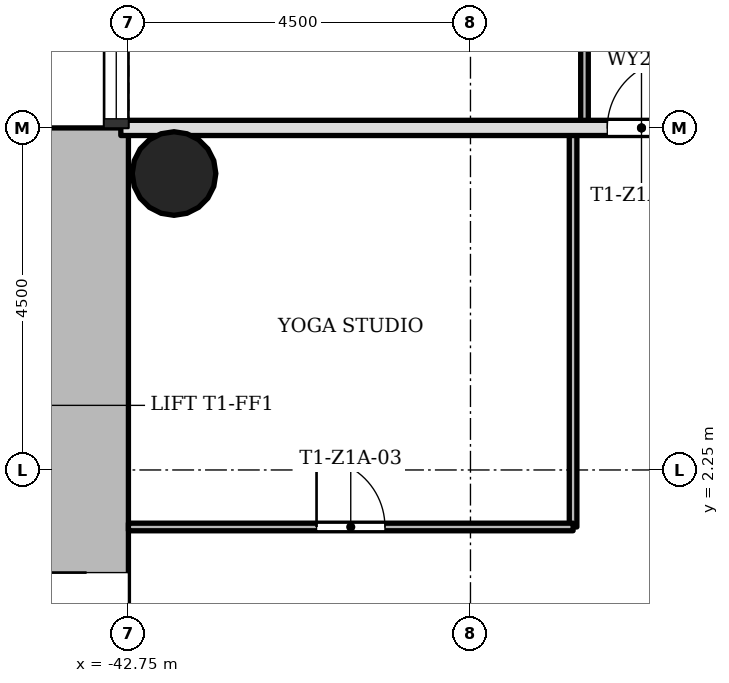
"""IFC4 building model, lengths in metres.
Left out: names, types, materials, properties, quantities, classifications, styles, units other than length and angle.
Written with IfcOpenShell. Run it as: python <this file> out.ifc"""

import sys

from ifc_helpers import new_model, si_unit, direction, frame, frame_2d, origin, origin_2d, place, context, subcontext, project, spatial, rectangle, hollow_circle, extrude, element, fill, save


model = new_model("IFC4")
c1 = context("Model", 3, precision=1e-05, world=origin(), true_north=direction((0.0, 1.0)))
c2 = subcontext(c1, "Body", "Model", "MODEL_VIEW")
j1 = project(units=[si_unit("LENGTHUNIT", "METRE"), si_unit("PLANEANGLEUNIT", "RADIAN")], contexts=[c1])
p1 = place(None, origin())
s1 = spatial("IfcSite", under=j1, at=p1, CompositionType="ELEMENT")
p2 = place(p1, origin())
s2 = spatial("IfcBuilding", under=s1, at=p2, CompositionType="ELEMENT")
p3 = place(p2, frame((0.0, 0.0, 27.9)))
s3 = spatial("IfcBuildingStorey", under=s2, at=p3, CompositionType="ELEMENT", Elevation=27.9)
p4 = place(p3, frame((-43.3, -5.65, 0.0), z_axis=(0.0, 0.0, 1.0), x_axis=(0.0, 1.0, 0.0)))
e1 = element("IfcWall", 1, at=p4, inside=s3, PredefinedType="SHEAR", context=c2, shape_type="SweptSolid", body=[
    extrude(rectangle(XDim=12.4, YDim=1.1, at=frame_2d((6.2, 0.0))), origin(), (0.0, 0.0, 1.0), 3.4),
])
p5 = place(p4, frame((4.75, 0.0, 0.0)))
e2 = element("IfcOpeningElement", 2, at=p5, cuts=e1, PredefinedType="OPENING", context=c2, shape_type="SweptSolid", body=[
    extrude(rectangle(XDim=1.8, YDim=2.1, at=frame_2d((0.9, 1.05))), frame((0.0, 0.56, 0.0), z_axis=(0.0, -1.0, 0.0), x_axis=(1.0, 0.0, 0.0)), (0.0, 0.0, 1.0), 1.12),
])
p6 = place(p3, frame((-42.15, 6.15, 0.0), z_axis=(0.0, 0.0, 1.0), x_axis=(1.0, 0.0, 0.0)))
e3 = element("IfcColumn", 3, at=p6, inside=s3, PredefinedType="COLUMN", context=c2, shape_type="SweptSolid", body=[
    extrude(hollow_circle(Radius=0.55, WallThickness=0.04, at=origin_2d()), origin(), (0.0, 0.0, 1.0), 3.4),
])
p7 = place(p3, frame((-36.9, 1.5, 0.0), z_axis=(0.0, 0.0, 1.0), x_axis=(0.0, 1.0, 0.0)))
e4 = element("IfcWall", 4, at=p7, inside=s3, PredefinedType="PARTITIONING", context=c2, shape_type="SweptSolid", body=[
    extrude(rectangle(XDim=5.25, YDim=0.1, at=frame_2d((2.625, 0.0))), origin(), (0.0, 0.0, 1.0), 3.0),
])
p8 = place(p3, frame((-36.75, 6.75, 0.0), z_axis=(0.0, 0.0, 1.0), x_axis=(0.0, 1.0, 0.0)))
e5 = element("IfcWall", 5, at=p8, inside=s3, PredefinedType="PARTITIONING", context=c2, shape_type="SweptSolid", body=[
    extrude(rectangle(XDim=7.8, YDim=0.1, at=frame_2d((3.9, 0.0))), origin(), (0.0, 0.0, 1.0), 3.0),
])
p9 = place(p8, frame((1.8, 0.0, 0.0)))
e6 = element("IfcOpeningElement", 6, at=p9, cuts=e5, PredefinedType="OPENING", context=c2, shape_type="SweptSolid", body=[
    extrude(rectangle(XDim=0.9, YDim=2.1, at=frame_2d((0.45, 1.05))), frame((0.0, 0.06, 0.0), z_axis=(0.0, -1.0, 0.0), x_axis=(1.0, 0.0, 0.0)), (0.0, 0.0, 1.0), 0.12),
])
p10 = place(p8, frame((4.95, 0.0, 0.0)))
e7 = element("IfcOpeningElement", 7, at=p10, cuts=e5, PredefinedType="OPENING", context=c2, shape_type="SweptSolid", body=[
    extrude(rectangle(XDim=0.9, YDim=2.1, at=frame_2d((0.45, 1.05))), frame((0.0, 0.06, 0.0), z_axis=(0.0, -1.0, 0.0), x_axis=(1.0, 0.0, 0.0)), (0.0, 0.0, 1.0), 0.12),
])
p11 = place(p8, frame((6.6, 0.0, 0.0)))
e8 = element("IfcOpeningElement", 8, at=p11, cuts=e5, PredefinedType="OPENING", context=c2, shape_type="SweptSolid", body=[
    extrude(rectangle(XDim=0.9, YDim=2.1, at=frame_2d((0.45, 1.05))), frame((0.0, 0.06, 0.0), z_axis=(0.0, -1.0, 0.0), x_axis=(1.0, 0.0, 0.0)), (0.0, 0.0, 1.0), 0.12),
])
p12 = place(p3, frame((-42.75, 1.5, 0.0), z_axis=(0.0, 0.0, 1.0), x_axis=(1.0, 0.0, 0.0)))
e9 = element("IfcWall", 9, at=p12, inside=s3, PredefinedType="PARTITIONING", context=c2, shape_type="SweptSolid", body=[
    extrude(rectangle(XDim=5.85, YDim=0.1, at=frame_2d((2.925, 0.0))), origin(), (0.0, 0.0, 1.0), 3.0),
])
p13 = place(p12, frame((2.475, 0.0, 0.0)))
e10 = element("IfcOpeningElement", 10, at=p13, cuts=e9, PredefinedType="OPENING", context=c2, shape_type="SweptSolid", body=[
    extrude(rectangle(XDim=0.9, YDim=2.1, at=frame_2d((0.45, 1.05))), frame((0.0, 0.06, 0.0), z_axis=(0.0, -1.0, 0.0), x_axis=(1.0, 0.0, 0.0)), (0.0, 0.0, 1.0), 0.12),
])
p14 = place(p3, frame((-42.85, 6.75, 0.0), z_axis=(0.0, 0.0, 1.0), x_axis=(1.0, 0.0, 0.0)))
e11 = element("IfcWall", 11, at=p14, inside=s3, PredefinedType="SOLIDWALL", context=c2, shape_type="SweptSolid", body=[
    extrude(rectangle(XDim=13.7, YDim=0.2, at=frame_2d((6.85, 0.0))), origin(), (0.0, 0.0, 1.0), 3.0),
])
p15 = place(p14, frame((6.4, 0.0, 0.0)))
e12 = element("IfcOpeningElement", 12, at=p15, cuts=e11, PredefinedType="OPENING", context=c2, shape_type="SweptSolid", body=[
    extrude(rectangle(XDim=0.9, YDim=2.1, at=frame_2d((0.45, 1.05))), frame((0.0, 0.11, 0.0), z_axis=(0.0, -1.0, 0.0), x_axis=(1.0, 0.0, 0.0)), (0.0, 0.0, 1.0), 0.22),
])
p16 = place(p13, origin())
e13 = element("IfcDoor", 13, at=p16, inside=s3, OperationType="SINGLE_SWING_RIGHT", PredefinedType="DOOR", context=c2, shape_type="SweptSolid", body=[
    extrude(rectangle(XDim=0.9, YDim=2.1, at=frame_2d((0.45, 1.05))), frame((0.0, 0.025, 0.0), z_axis=(0.0, -1.0, 0.0), x_axis=(1.0, 0.0, 0.0)), (0.0, 0.0, 1.0), 0.05),
])
fill(e10, e13)
p17 = place(p15, origin())
e14 = element("IfcDoor", 14, at=p17, inside=s3, OperationType="SINGLE_SWING_LEFT", PredefinedType="DOOR", context=c2, shape_type="SweptSolid", body=[
    extrude(rectangle(XDim=0.9, YDim=2.1, at=frame_2d((0.45, 1.05))), frame((0.0, 0.025, 0.0), z_axis=(0.0, -1.0, 0.0), x_axis=(1.0, 0.0, 0.0)), (0.0, 0.0, 1.0), 0.05),
])
fill(e12, e14)
p18 = place(p5, origin())
e15 = element("IfcDoor", 15, at=p18, inside=s3, OperationType="SINGLE_SWING_LEFT", PredefinedType="DOOR", context=c2, shape_type="SweptSolid", body=[
    extrude(rectangle(XDim=1.8, YDim=2.1, at=frame_2d((0.9, 1.05))), frame((0.0, 0.025, 0.0), z_axis=(0.0, -1.0, 0.0), x_axis=(1.0, 0.0, 0.0)), (0.0, 0.0, 1.0), 0.05),
])
fill(e2, e15)
save(model, sys.argv[1])
